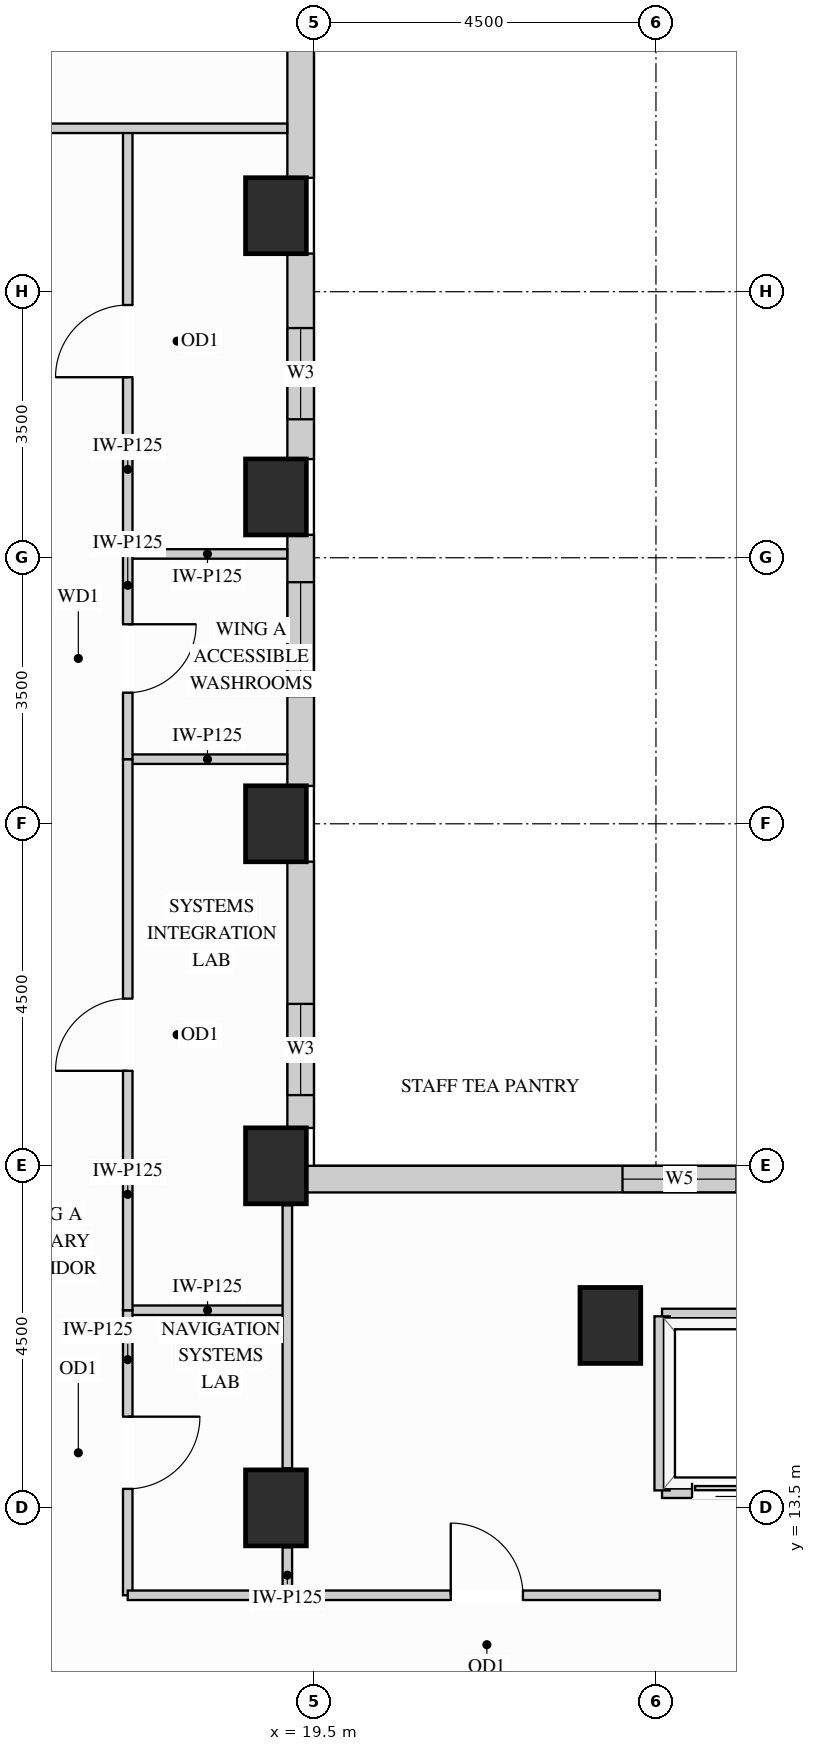
"""IFC4 building model, lengths in metres.
Left out: names, types, materials, properties, quantities, classifications, styles, units other than length and angle.
Written with IfcOpenShell. Run it as: python <this file> out.ifc"""

import sys

from ifc_helpers import new_model, si_unit, direction, frame, frame_2d, origin, origin_2d, place, context, subcontext, project, spatial, rectangle, extrude, source, transform, mapped, element, fill, save


model = new_model("IFC4")
c1 = context("Model", 3, precision=1e-05, world=origin(), true_north=direction((0.0, 1.0)))
c2 = subcontext(c1, "Body", "Model", "MODEL_VIEW")
j1 = project(units=[si_unit("LENGTHUNIT", "METRE"), si_unit("PLANEANGLEUNIT", "RADIAN")], contexts=[c1])
p1 = place(None, origin())
s1 = spatial("IfcSite", under=j1, at=p1, CompositionType="ELEMENT")
p2 = place(p1, origin())
s2 = spatial("IfcBuilding", under=s1, at=p2, CompositionType="ELEMENT")
p3 = place(p2, frame((0.0, 0.0, 193.5)))
s3 = spatial("IfcBuildingStorey", under=s2, at=p3, CompositionType="ELEMENT", Elevation=193.5)
m1 = source(origin(), c2, "Body", "SweptSolid", [
    extrude(rectangle(XDim=0.8, YDim=1.0, at=origin_2d()), origin(), (0.0, 0.0, 1.0), 3.4),
])
for number, where, z_axis, x_axis in (
    (1, (19.0, 13.5, 0.0), (0.0, 0.0, 1.0), (1.0, 0.0, 0.0)),
    (2, (19.0, 18.0, 0.0), (0.0, 0.0, 1.0), (1.0, 0.0, 0.0)),
    (3, (19.0, 22.5, 0.0), (0.0, 0.0, 1.0), (1.0, 0.0, 0.0)),
    (4, (19.0, 26.8, 0.0), (0.0, 0.0, 1.0), (1.0, 0.0, 0.0)),
    (5, (19.0, 30.5, 0.0), (0.0, 0.0, 1.0), (1.0, 0.0, 0.0)),
    (6, (23.4, 15.9, 0.0), (0.0, 0.0, 1.0), (1.0, 0.0, 0.0)),
):
    element("IfcColumn", number, at=place(p3, frame(where, z_axis=z_axis, x_axis=x_axis)), inside=s3, PredefinedType="COLUMN", context=c2, shape_type="MappedRepresentation", body=[
        mapped(m1, transform((0.0, 0.0, 0.0), x_axis=(1.0, 0.0, 0.0), y_axis=(0.0, 1.0, 0.0), z_axis=(0.0, 0.0, 1.0))),
    ])
p4 = place(p3, frame((34.502, 17.825, 0.0), z_axis=(0.0, 0.0, 1.0), x_axis=(-1.0, 0.0, 0.0)))
e7 = element("IfcWall", 7, at=p4, inside=s3, PredefinedType="SOLIDWALL", context=c2, shape_type="SweptSolid", body=[
    extrude(rectangle(XDim=15.104, YDim=0.35, at=frame_2d((7.552, 0.0))), origin(), (0.0, 0.0, 1.0), 3.385),
])
p5 = place(p4, frame((4.131, 0.0, 0.78)))
e8 = element("IfcOpeningElement", 8, at=p5, cuts=e7, PredefinedType="OPENING", context=c2, shape_type="SweptSolid", body=[
    extrude(rectangle(XDim=1.5, YDim=2.0, at=frame_2d((0.75, 1.0))), frame((0.0, 0.185, 0.0), z_axis=(0.0, -1.0, 0.0), x_axis=(1.0, 0.0, 0.0)), (0.0, 0.0, 1.0), 0.37),
])
p6 = place(p4, frame((9.442, 0.0, 0.78)))
e9 = element("IfcOpeningElement", 9, at=p6, cuts=e7, PredefinedType="OPENING", context=c2, shape_type="SweptSolid", body=[
    extrude(rectangle(XDim=1.5, YDim=2.0, at=frame_2d((0.75, 1.0))), frame((0.0, 0.185, 0.0), z_axis=(0.0, -1.0, 0.0), x_axis=(1.0, 0.0, 0.0)), (0.0, 0.0, 1.0), 0.37),
])
p7 = place(p3, frame((19.325, 18.498, 0.0), z_axis=(0.0, 0.0, 1.0), x_axis=(0.0, 1.0, 0.0)))
e10 = element("IfcWall", 10, at=p7, inside=s3, PredefinedType="SOLIDWALL", context=c2, shape_type="SweptSolid", body=[
    extrude(rectangle(XDim=3.504, YDim=0.35, at=frame_2d((1.752, 0.0))), origin(), (0.0, 0.0, 1.0), 2.612),
])
p8 = place(p7, frame((0.433, 0.0, 0.78)))
e11 = element("IfcOpeningElement", 11, at=p8, cuts=e10, PredefinedType="OPENING", context=c2, shape_type="SweptSolid", body=[
    extrude(rectangle(XDim=1.2, YDim=1.652, at=frame_2d((0.6, 0.826))), frame((0.0, 0.185, 0.0), z_axis=(0.0, -1.0, 0.0), x_axis=(1.0, 0.0, 0.0)), (0.0, 0.0, 1.0), 0.37),
])
p9 = place(p3, frame((19.325, 22.998, 0.0), z_axis=(0.0, 0.0, 1.0), x_axis=(0.0, 1.0, 0.0)))
e12 = element("IfcWall", 12, at=p9, inside=s3, PredefinedType="SOLIDWALL", context=c2, shape_type="SweptSolid", body=[
    extrude(rectangle(XDim=3.304, YDim=0.35, at=frame_2d((1.652, 0.0))), origin(), (0.0, 0.0, 1.0), 2.612),
])
p10 = place(p9, frame((1.18, 0.0, 0.78)))
e13 = element("IfcOpeningElement", 13, at=p10, cuts=e12, PredefinedType="OPENING", context=c2, shape_type="SweptSolid", body=[
    extrude(rectangle(XDim=1.5, YDim=1.652, at=frame_2d((0.75, 0.826))), frame((0.0, 0.185, 0.0), z_axis=(0.0, -1.0, 0.0), x_axis=(1.0, 0.0, 0.0)), (0.0, 0.0, 1.0), 0.37),
])
p11 = place(p3, frame((19.325, 27.298, 0.0), z_axis=(0.0, 0.0, 1.0), x_axis=(0.0, 1.0, 0.0)))
e14 = element("IfcWall", 14, at=p11, inside=s3, PredefinedType="SOLIDWALL", context=c2, shape_type="SweptSolid", body=[
    extrude(rectangle(XDim=2.704, YDim=0.35, at=frame_2d((1.352, 0.0))), origin(), (0.0, 0.0, 1.0), 2.612),
])
p12 = place(p11, frame((0.524, 0.0, 0.78)))
e15 = element("IfcOpeningElement", 15, at=p12, cuts=e14, PredefinedType="OPENING", context=c2, shape_type="SweptSolid", body=[
    extrude(rectangle(XDim=1.2, YDim=1.652, at=frame_2d((0.6, 0.826))), frame((0.0, 0.185, 0.0), z_axis=(0.0, -1.0, 0.0), x_axis=(1.0, 0.0, 0.0)), (0.0, 0.0, 1.0), 0.37),
])
m2 = source(origin(), c2, "Body", "SweptSolid", [
    extrude(rectangle(XDim=3.504, YDim=0.35, at=frame_2d((1.752, 0.0))), origin(), (0.0, 0.0, 1.0), 2.612),
])
p13 = place(p3, frame((19.325, 30.998, 0.0), z_axis=(0.0, 0.0, 1.0), x_axis=(0.0, 1.0, 0.0)))
e16 = element("IfcWall", 16, at=p13, inside=s3, PredefinedType="SOLIDWALL", context=c2, shape_type="MappedRepresentation", body=[
    mapped(m2, transform((0.0, 0.0, 0.0), x_axis=(1.0, 0.0, 0.0), y_axis=(0.0, 1.0, 0.0), z_axis=(0.0, 0.0, 1.0))),
])
m3 = source(origin(), c2, "Body", "SweptSolid", [
    extrude(rectangle(XDim=2.1, YDim=0.125, at=frame_2d((1.05, 0.0))), origin(), (0.0, 0.0, 1.0), 3.385),
])
p14 = place(p3, frame((17.05, 16.1, 0.0), z_axis=(0.0, 0.0, 1.0), x_axis=(1.0, 0.0, 0.0)))
e17 = element("IfcWall", 17, at=p14, inside=s3, PredefinedType="PARTITIONING", context=c2, shape_type="MappedRepresentation", body=[
    mapped(m3, transform((0.0, 0.0, 0.0), x_axis=(1.0, 0.0, 0.0), y_axis=(0.0, 1.0, 0.0), z_axis=(0.0, 0.0, 1.0))),
])
m4 = source(origin(), c2, "Body", "SweptSolid", [
    extrude(rectangle(XDim=2.098, YDim=0.125, at=frame_2d((1.049, 0.0))), origin(), (0.0, 0.0, 1.0), 3.385),
])
for number, where, z_axis, x_axis in (
    (18, (17.05, 23.35, 0.0), (0.0, 0.0, 1.0), (1.0, 0.0, 0.0)),
    (19, (17.05, 26.05, 0.0), (0.0, 0.0, 1.0), (1.0, 0.0, 0.0)),
):
    element("IfcWall", number, at=place(p3, frame(where, z_axis=z_axis, x_axis=x_axis)), inside=s3, PredefinedType="PARTITIONING", context=c2, shape_type="MappedRepresentation", body=[
        mapped(m4, transform((0.0, 0.0, 0.0), x_axis=(1.0, 0.0, 0.0), y_axis=(0.0, 1.0, 0.0), z_axis=(0.0, 0.0, 1.0))),
    ])
m5 = source(origin(), c2, "Body", "SweptSolid", [
    extrude(rectangle(XDim=0.63, YDim=0.125, at=frame_2d((0.315, 0.0))), origin(), (0.0, 0.0, 1.0), 2.773),
])
p15 = place(p3, frame((19.15, 12.35, 0.0), z_axis=(0.0, 0.0, 1.0), x_axis=(0.0, 1.0, 0.0)))
e20 = element("IfcWall", 20, at=p15, inside=s3, PredefinedType="PARTITIONING", context=c2, shape_type="MappedRepresentation", body=[
    mapped(m5, transform((0.0, 0.0, 0.0), x_axis=(1.0, 0.0, 0.0), y_axis=(0.0, 1.0, 0.0), z_axis=(0.0, 0.0, 1.0))),
])
m6 = source(origin(), c2, "Body", "SweptSolid", [
    extrude(rectangle(XDim=3.46, YDim=0.125, at=frame_2d((1.73, 0.0))), origin(), (0.0, 0.0, 1.0), 2.773),
])
p16 = place(p3, frame((19.15, 14.02, 0.0), z_axis=(0.0, 0.0, 1.0), x_axis=(0.0, 1.0, 0.0)))
e21 = element("IfcWall", 21, at=p16, inside=s3, PredefinedType="PARTITIONING", context=c2, shape_type="MappedRepresentation", body=[
    mapped(m6, transform((0.0, 0.0, 0.0), x_axis=(1.0, 0.0, 0.0), y_axis=(0.0, 1.0, 0.0), z_axis=(0.0, 0.0, 1.0))),
])
p17 = place(p3, frame((17.05, 12.35, 0.0), z_axis=(0.0, 0.0, 1.0), x_axis=(0.0, 1.0, 0.0)))
e22 = element("IfcWall", 22, at=p17, inside=s3, PredefinedType="PARTITIONING", context=c2, shape_type="SweptSolid", body=[
    extrude(rectangle(XDim=3.75, YDim=0.125, at=frame_2d((1.875, 0.0))), origin(), (0.0, 0.0, 1.0), 3.385),
])
p18 = place(p17, frame((1.4, 0.0, 0.0)))
e23 = element("IfcOpeningElement", 23, at=p18, cuts=e22, PredefinedType="OPENING", context=c2, shape_type="SweptSolid", body=[
    extrude(rectangle(XDim=0.95, YDim=2.15, at=frame_2d((0.475, 1.075))), frame((0.0, 0.073, 0.0), z_axis=(0.0, -1.0, 0.0), x_axis=(1.0, 0.0, 0.0)), (0.0, 0.0, 1.0), 0.145),
])
p19 = place(p3, frame((17.05, 16.1, 0.0), z_axis=(0.0, 0.0, 1.0), x_axis=(0.0, 1.0, 0.0)))
e24 = element("IfcWall", 24, at=p19, inside=s3, PredefinedType="PARTITIONING", context=c2, shape_type="SweptSolid", body=[
    extrude(rectangle(XDim=7.25, YDim=0.125, at=frame_2d((3.625, 0.0))), origin(), (0.0, 0.0, 1.0), 3.385),
])
p20 = place(p19, frame((3.15, 0.0, 0.0)))
e25 = element("IfcOpeningElement", 25, at=p20, cuts=e24, PredefinedType="OPENING", context=c2, shape_type="SweptSolid", body=[
    extrude(rectangle(XDim=0.95, YDim=2.15, at=frame_2d((0.475, 1.075))), frame((0.0, 0.073, 0.0), z_axis=(0.0, -1.0, 0.0), x_axis=(1.0, 0.0, 0.0)), (0.0, 0.0, 1.0), 0.145),
])
p21 = place(p3, frame((17.05, 26.05, 0.0), z_axis=(0.0, 0.0, 1.0), x_axis=(0.0, 1.0, 0.0)))
e26 = element("IfcWall", 26, at=p21, inside=s3, PredefinedType="PARTITIONING", context=c2, shape_type="SweptSolid", body=[
    extrude(rectangle(XDim=5.6, YDim=0.125, at=frame_2d((2.8, 0.0))), origin(), (0.0, 0.0, 1.0), 3.385),
])
p22 = place(p21, frame((2.325, 0.0, 0.0)))
e27 = element("IfcOpeningElement", 27, at=p22, cuts=e26, PredefinedType="OPENING", context=c2, shape_type="SweptSolid", body=[
    extrude(rectangle(XDim=0.95, YDim=2.15, at=frame_2d((0.475, 1.075))), frame((0.0, 0.073, 0.0), z_axis=(0.0, -1.0, 0.0), x_axis=(1.0, 0.0, 0.0)), (0.0, 0.0, 1.0), 0.145),
])
p23 = place(p3, frame((17.05, 23.35, 0.0), z_axis=(0.0, 0.0, 1.0), x_axis=(0.0, 1.0, 0.0)))
e28 = element("IfcWall", 28, at=p23, inside=s3, PredefinedType="PARTITIONING", context=c2, shape_type="SweptSolid", body=[
    extrude(rectangle(XDim=2.7, YDim=0.125, at=frame_2d((1.35, 0.0))), origin(), (0.0, 0.0, 1.0), 3.385),
])
p24 = place(p23, frame((0.875, 0.0, 0.0)))
e29 = element("IfcOpeningElement", 29, at=p24, cuts=e28, PredefinedType="OPENING", context=c2, shape_type="SweptSolid", body=[
    extrude(rectangle(XDim=0.9, YDim=2.15, at=frame_2d((0.45, 1.075))), frame((0.0, 0.073, 0.0), z_axis=(0.0, -1.0, 0.0), x_axis=(1.0, 0.0, 0.0)), (0.0, 0.0, 1.0), 0.145),
])
m7 = source(origin(), c2, "Body", "SweptSolid", [
    extrude(rectangle(XDim=12.598, YDim=0.125, at=frame_2d((6.299, 0.0))), origin(), (0.0, 0.0, 1.0), 2.848),
])
p25 = place(p3, frame((6.55, 31.65, 0.0), z_axis=(0.0, 0.0, 1.0), x_axis=(1.0, 0.0, 0.0)))
e30 = element("IfcWall", 30, at=p25, inside=s3, PredefinedType="PARTITIONING", context=c2, shape_type="MappedRepresentation", body=[
    mapped(m7, transform((0.0, 0.0, 0.0), x_axis=(1.0, 0.0, 0.0), y_axis=(0.0, 1.0, 0.0), z_axis=(0.0, 0.0, 1.0))),
])
m8 = source(origin(), c2, "Body", "SweptSolid", [
    extrude(rectangle(XDim=2.45, YDim=0.125, at=frame_2d((1.225, 0.0))), origin(), (0.0, 0.0, 1.0), 3.385),
])
p26 = place(p3, frame((17.05, 12.35, 0.0), z_axis=(0.0, 0.0, 1.0), x_axis=(1.0, 0.0, 0.0)))
e31 = element("IfcWall", 31, at=p26, inside=s3, PredefinedType="PARTITIONING", context=c2, shape_type="MappedRepresentation", body=[
    mapped(m8, transform((0.0, 0.0, 0.0), x_axis=(1.0, 0.0, 0.0), y_axis=(0.0, 1.0, 0.0), z_axis=(0.0, 0.0, 1.0))),
])
p27 = place(p3, frame((19.5, 12.35, 0.0), z_axis=(0.0, 0.0, 1.0), x_axis=(1.0, 0.0, 0.0)))
e32 = element("IfcWall", 32, at=p27, inside=s3, PredefinedType="PARTITIONING", context=c2, shape_type="SweptSolid", body=[
    extrude(rectangle(XDim=4.55, YDim=0.125, at=frame_2d((2.275, 0.0))), origin(), (0.0, 0.0, 1.0), 3.385),
])
p28 = place(p27, frame((1.8, 0.0, 0.0)))
e33 = element("IfcOpeningElement", 33, at=p28, cuts=e32, PredefinedType="OPENING", context=c2, shape_type="SweptSolid", body=[
    extrude(rectangle(XDim=0.95, YDim=2.15, at=frame_2d((0.475, 1.075))), frame((0.0, 0.073, 0.0), z_axis=(0.0, -1.0, 0.0), x_axis=(1.0, 0.0, 0.0)), (0.0, 0.0, 1.0), 0.145),
])
m9 = source(origin(), c2, "Body", "SweptSolid", [
    extrude(rectangle(XDim=1.89, YDim=0.2, at=frame_2d((0.945, 0.0))), origin(), (0.0, 0.0, 1.0), 2.773),
])
p29 = place(p3, frame((24.08, 16.02, 0.0), z_axis=(0.0, 0.0, 1.0), x_axis=(1.0, 0.0, 0.0)))
e34 = element("IfcWall", 34, at=p29, inside=s3, PredefinedType="PARTITIONING", context=c2, shape_type="MappedRepresentation", body=[
    mapped(m9, transform((0.0, 0.0, 0.0), x_axis=(1.0, 0.0, 0.0), y_axis=(0.0, 1.0, 0.0), z_axis=(0.0, 0.0, 1.0))),
])
p30 = place(p3, frame((24.08, 13.73, 0.0), z_axis=(0.0, 0.0, 1.0), x_axis=(1.0, 0.0, 0.0)))
e35 = element("IfcWall", 35, at=p30, inside=s3, PredefinedType="PARTITIONING", context=c2, shape_type="SweptSolid", body=[
    extrude(rectangle(XDim=1.89, YDim=0.2, at=frame_2d((0.945, 0.0))), origin(), (0.0, 0.0, 1.0), 2.466),
])
p31 = place(p30, frame((0.395, 0.0, 0.0)))
e36 = element("IfcOpeningElement", 36, at=p31, cuts=e35, PredefinedType="OPENING", context=c2, shape_type="SweptSolid", body=[
    extrude(rectangle(XDim=1.1, YDim=2.2, at=frame_2d((0.55, 1.1))), frame((0.0, 0.11, 0.0), z_axis=(0.0, -1.0, 0.0), x_axis=(1.0, 0.0, 0.0)), (0.0, 0.0, 1.0), 0.22),
])
m10 = source(origin(), c2, "Body", "SweptSolid", [
    extrude(rectangle(XDim=2.29, YDim=0.2, at=frame_2d((1.145, 0.0))), origin(), (0.0, 0.0, 1.0), 3.385),
])
p32 = place(p3, frame((24.08, 13.73, 0.0), z_axis=(0.0, 0.0, 1.0), x_axis=(0.0, 1.0, 0.0)))
e37 = element("IfcWall", 37, at=p32, inside=s3, PredefinedType="PARTITIONING", context=c2, shape_type="MappedRepresentation", body=[
    mapped(m10, transform((0.0, 0.0, 0.0), x_axis=(1.0, 0.0, 0.0), y_axis=(0.0, 1.0, 0.0), z_axis=(0.0, 0.0, 1.0))),
])
m11 = source(origin(), c2, "Body", "SweptSolid", [
    extrude(rectangle(XDim=1.1, YDim=2.2, at=frame_2d((0.55, 1.1))), frame((0.0, 0.025, 0.0), z_axis=(0.0, -1.0, 0.0), x_axis=(1.0, 0.0, 0.0)), (0.0, 0.0, 1.0), 0.05),
])
p33 = place(p31, origin())
e38 = element("IfcDoor", 38, at=p33, inside=s3, OperationType="SLIDING_TO_LEFT", PredefinedType="DOOR", context=c2, shape_type="MappedRepresentation", body=[
    mapped(m11, transform((0.0, 0.0, 0.0), x_axis=(1.0, 0.0, 0.0), y_axis=(0.0, 1.0, 0.0), z_axis=(0.0, 0.0, 1.0))),
])
fill(e36, e38)
m12 = source(origin(), c2, "Body", "SweptSolid", [
    extrude(rectangle(XDim=0.95, YDim=2.15, at=frame_2d((0.475, 1.075))), frame((0.0, 0.025, 0.0), z_axis=(0.0, -1.0, 0.0), x_axis=(1.0, 0.0, 0.0)), (0.0, 0.0, 1.0), 0.05),
])
p34 = place(p18, origin())
e39 = element("IfcDoor", 39, at=p34, inside=s3, OperationType="SINGLE_SWING_RIGHT", PredefinedType="DOOR", context=c2, shape_type="MappedRepresentation", body=[
    mapped(m12, transform((0.0, 0.0, 0.0), x_axis=(1.0, 0.0, 0.0), y_axis=(0.0, 1.0, 0.0), z_axis=(0.0, 0.0, 1.0))),
])
fill(e23, e39)
p35 = place(p20, origin())
e40 = element("IfcDoor", 40, at=p35, inside=s3, OperationType="SINGLE_SWING_LEFT", PredefinedType="DOOR", context=c2, shape_type="MappedRepresentation", body=[
    mapped(m12, transform((0.0, 0.0, 0.0), x_axis=(1.0, 0.0, 0.0), y_axis=(0.0, 1.0, 0.0), z_axis=(0.0, 0.0, 1.0))),
])
fill(e25, e40)
p36 = place(p22, origin())
e41 = element("IfcDoor", 41, at=p36, inside=s3, OperationType="SINGLE_SWING_LEFT", PredefinedType="DOOR", context=c2, shape_type="MappedRepresentation", body=[
    mapped(m12, transform((0.0, 0.0, 0.0), x_axis=(1.0, 0.0, 0.0), y_axis=(0.0, 1.0, 0.0), z_axis=(0.0, 0.0, 1.0))),
])
fill(e27, e41)
p37 = place(p28, origin())
e42 = element("IfcDoor", 42, at=p37, inside=s3, OperationType="SINGLE_SWING_LEFT", PredefinedType="DOOR", context=c2, shape_type="MappedRepresentation", body=[
    mapped(m12, transform((0.0, 0.0, 0.0), x_axis=(1.0, 0.0, 0.0), y_axis=(0.0, 1.0, 0.0), z_axis=(0.0, 0.0, 1.0))),
])
fill(e33, e42)
m13 = source(origin(), c2, "Body", "SweptSolid", [
    extrude(rectangle(XDim=0.9, YDim=2.15, at=frame_2d((0.45, 1.075))), frame((0.0, 0.025, 0.0), z_axis=(0.0, -1.0, 0.0), x_axis=(1.0, 0.0, 0.0)), (0.0, 0.0, 1.0), 0.05),
])
p38 = place(p24, origin())
e43 = element("IfcDoor", 43, at=p38, inside=s3, OperationType="SINGLE_SWING_RIGHT", PredefinedType="DOOR", context=c2, shape_type="MappedRepresentation", body=[
    mapped(m13, transform((0.0, 0.0, 0.0), x_axis=(1.0, 0.0, 0.0), y_axis=(0.0, 1.0, 0.0), z_axis=(0.0, 0.0, 1.0))),
])
fill(e29, e43)
m14 = source(origin(), c2, "Body", "SweptSolid", [
    extrude(rectangle(XDim=1.2, YDim=1.652, at=frame_2d((0.6, 0.826))), frame((0.0, 0.03, 0.0), z_axis=(0.0, -1.0, 0.0), x_axis=(1.0, 0.0, 0.0)), (0.0, 0.0, 1.0), 0.06),
])
p39 = place(p8, origin())
e44 = element("IfcWindow", 44, at=p39, inside=s3, PartitioningType="SINGLE_PANEL", PredefinedType="WINDOW", context=c2, shape_type="MappedRepresentation", body=[
    mapped(m14, transform((0.0, 0.0, 0.0), x_axis=(1.0, 0.0, 0.0), y_axis=(0.0, 1.0, 0.0), z_axis=(0.0, 0.0, 1.0))),
])
fill(e11, e44)
p40 = place(p12, origin())
e45 = element("IfcWindow", 45, at=p40, inside=s3, PartitioningType="SINGLE_PANEL", PredefinedType="WINDOW", context=c2, shape_type="MappedRepresentation", body=[
    mapped(m14, transform((0.0, 0.0, 0.0), x_axis=(1.0, 0.0, 0.0), y_axis=(0.0, 1.0, 0.0), z_axis=(0.0, 0.0, 1.0))),
])
fill(e15, e45)
m15 = source(origin(), c2, "Body", "SweptSolid", [
    extrude(rectangle(XDim=1.5, YDim=2.0, at=frame_2d((0.75, 1.0))), frame((0.0, 0.03, 0.0), z_axis=(0.0, -1.0, 0.0), x_axis=(1.0, 0.0, 0.0)), (0.0, 0.0, 1.0), 0.06),
])
p41 = place(p6, origin())
e46 = element("IfcWindow", 46, at=p41, inside=s3, PartitioningType="SINGLE_PANEL", PredefinedType="WINDOW", context=c2, shape_type="MappedRepresentation", body=[
    mapped(m15, transform((0.0, 0.0, 0.0), x_axis=(1.0, 0.0, 0.0), y_axis=(0.0, 1.0, 0.0), z_axis=(0.0, 0.0, 1.0))),
])
fill(e9, e46)
m16 = source(origin(), c2, "Body", "SweptSolid", [
    extrude(rectangle(XDim=1.5, YDim=1.652, at=frame_2d((0.75, 0.826))), frame((0.0, 0.03, 0.0), z_axis=(0.0, -1.0, 0.0), x_axis=(1.0, 0.0, 0.0)), (0.0, 0.0, 1.0), 0.06),
])
p42 = place(p10, origin())
e47 = element("IfcWindow", 47, at=p42, inside=s3, PartitioningType="SINGLE_PANEL", PredefinedType="WINDOW", context=c2, shape_type="MappedRepresentation", body=[
    mapped(m16, transform((0.0, 0.0, 0.0), x_axis=(1.0, 0.0, 0.0), y_axis=(0.0, 1.0, 0.0), z_axis=(0.0, 0.0, 1.0))),
])
fill(e13, e47)
save(model, sys.argv[1])
